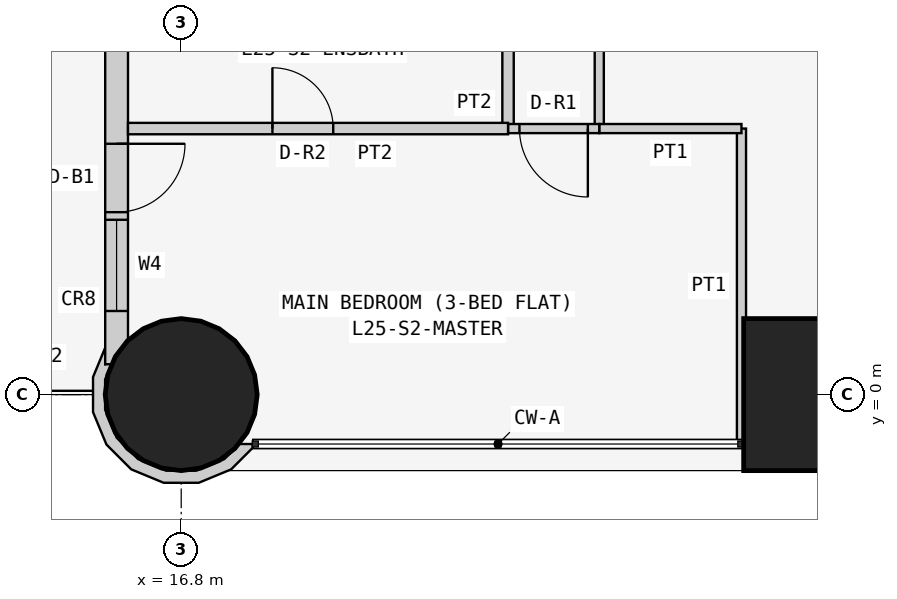
"""IFC4 building model, lengths in metres.
Left out: names, types, materials, properties, quantities, classifications, styles, units other than length and angle.
Written with IfcOpenShell. Run it as: python <this file> out.ifc"""

import sys

from ifc_helpers import new_model, si_unit, direction, frame, frame_2d, origin, origin_2d, place, context, subcontext, project, spatial, polyline, rectangle, circle, outline, extrude, element, fill, save


model = new_model("IFC4")
c1 = context("Model", 3, precision=1e-05, world=origin(), true_north=direction((0.0, 1.0)))
c2 = subcontext(c1, "Body", "Model", "MODEL_VIEW")
j1 = project(units=[si_unit("LENGTHUNIT", "METRE"), si_unit("PLANEANGLEUNIT", "RADIAN")], contexts=[c1])
p1 = place(None, origin())
s1 = spatial("IfcSite", under=j1, at=p1, CompositionType="ELEMENT")
p2 = place(p1, origin())
s2 = spatial("IfcBuilding", under=s1, at=p2, CompositionType="ELEMENT")
p3 = place(p2, frame((0.0, 0.0, 99.3)))
s3 = spatial("IfcBuildingStorey", under=s2, at=p3, CompositionType="ELEMENT", Elevation=99.3)
p4 = place(p3, frame((16.8, 0.0, 0.0), z_axis=(0.0, 0.0, 1.0), x_axis=(1.0, 0.0, 0.0)))
e1 = element("IfcColumn", 1, at=p4, inside=s3, PredefinedType="COLUMN", context=c2, shape_type="SweptSolid", body=[
    extrude(circle(Radius=1.0, at=origin_2d()), origin(), (0.0, 0.0, 1.0), 3.6),
])
p5 = place(p3, frame((25.2, 0.0, 0.0), z_axis=(0.0, 0.0, 1.0), x_axis=(1.0, 0.0, 0.0)))
e2 = element("IfcColumn", 2, at=p5, inside=s3, PredefinedType="COLUMN", context=c2, shape_type="SweptSolid", body=[
    extrude(rectangle(XDim=2.0, YDim=2.0, at=origin_2d()), origin(), (0.0, 0.0, 1.0), 3.6),
])
p6 = place(p3, frame((15.95, 15.8, 0.0), z_axis=(0.0, 0.0, 1.0), x_axis=(0.0, -1.0, 0.0)))
e3 = element("IfcWall", 3, at=p6, inside=s3, PredefinedType="SOLIDWALL", context=c2, shape_type="SweptSolid", body=[
    extrude(rectangle(XDim=15.4, YDim=0.3, at=frame_2d((7.7, 0.0))), origin(), (0.0, 0.0, 1.0), 3.35),
])
p7 = place(p6, frame((1.2, 0.0, 0.9)))
e4 = element("IfcOpeningElement", 4, at=p7, cuts=e3, PredefinedType="OPENING", context=c2, shape_type="SweptSolid", body=[
    extrude(rectangle(XDim=1.8, YDim=1.5, at=frame_2d((0.9, 0.75))), frame((0.0, 0.16, 0.0), z_axis=(0.0, -1.0, 0.0), x_axis=(1.0, 0.0, 0.0)), (0.0, 0.0, 1.0), 0.32),
])
p8 = place(p6, frame((4.95, 0.0, 1.5)))
e5 = element("IfcOpeningElement", 5, at=p8, cuts=e3, PredefinedType="OPENING", context=c2, shape_type="SweptSolid", body=[
    extrude(rectangle(XDim=0.9, YDim=0.7, at=frame_2d((0.45, 0.35))), frame((0.0, 0.16, 0.0), z_axis=(0.0, -1.0, 0.0), x_axis=(1.0, 0.0, 0.0)), (0.0, 0.0, 1.0), 0.32),
])
p9 = place(p6, frame((8.5, 0.0, 0.9)))
e6 = element("IfcOpeningElement", 6, at=p9, cuts=e3, PredefinedType="OPENING", context=c2, shape_type="SweptSolid", body=[
    extrude(rectangle(XDim=1.8, YDim=1.5, at=frame_2d((0.9, 0.75))), frame((0.0, 0.16, 0.0), z_axis=(0.0, -1.0, 0.0), x_axis=(1.0, 0.0, 0.0)), (0.0, 0.0, 1.0), 0.32),
])
p10 = place(p6, frame((12.5, 0.0, 0.0)))
e7 = element("IfcOpeningElement", 7, at=p10, cuts=e3, PredefinedType="OPENING", context=c2, shape_type="SweptSolid", body=[
    extrude(rectangle(XDim=0.9, YDim=2.4, at=frame_2d((0.45, 1.2))), frame((0.0, 0.16, 0.0), z_axis=(0.0, -1.0, 0.0), x_axis=(1.0, 0.0, 0.0)), (0.0, 0.0, 1.0), 0.32),
])
p11 = place(p6, frame((13.5, 0.0, 0.9)))
e8 = element("IfcOpeningElement", 8, at=p11, cuts=e3, PredefinedType="OPENING", context=c2, shape_type="SweptSolid", body=[
    extrude(rectangle(XDim=1.2, YDim=1.5, at=frame_2d((0.6, 0.75))), frame((0.0, 0.16, 0.0), z_axis=(0.0, -1.0, 0.0), x_axis=(1.0, 0.0, 0.0)), (0.0, 0.0, 1.0), 0.32),
])
p12 = place(p3, frame((15.881, 0.567, 0.0), z_axis=(0.0, 0.0, 1.0), x_axis=(-0.555974394895, -0.831199417842, 0.0)))
e9 = element("IfcWall", 9, at=p12, inside=s3, PredefinedType="SOLIDWALL", context=c2, shape_type="SweptSolid", body=[
    extrude(outline(polyline([(0.075, 2.077), (0.351, 2.022), (0.682, 1.801), (0.903, 1.47), (0.981, 1.08), (0.903, 0.689), (0.682, 0.358), (0.351, 0.137), (0.126, 0.092), (0.184, 0.026), (0.004, -0.095), (0.414, -0.013), (0.797, 0.243), (1.053, 0.627), (1.143, 1.08), (1.053, 1.532), (0.796, 1.916), (0.412, 2.172), (0.017, 2.251), (-0.023, 2.224), (0.075, 2.077)])), origin(), (0.0, 0.0, 1.0), 3.35),
])
p13 = place(p3, frame((22.3, 3.5, 0.0), z_axis=(0.0, 0.0, 1.0), x_axis=(0.0, 1.0, 0.0)))
e10 = element("IfcWall", 10, at=p13, inside=s3, PredefinedType="PARTITIONING", context=c2, shape_type="SweptSolid", body=[
    extrude(rectangle(XDim=4.9, YDim=0.12, at=frame_2d((2.45, 0.0))), origin(), (0.0, 0.0, 1.0), 3.35),
])
p14 = place(p13, frame((1.85, 0.0, 0.0)))
e11 = element("IfcOpeningElement", 11, at=p14, cuts=e10, PredefinedType="OPENING", context=c2, shape_type="SweptSolid", body=[
    extrude(rectangle(XDim=0.9, YDim=2.1, at=frame_2d((0.45, 1.05))), frame((0.0, 0.07, 0.0), z_axis=(0.0, -1.0, 0.0), x_axis=(1.0, 0.0, 0.0)), (0.0, 0.0, 1.0), 0.14),
])
p15 = place(p3, frame((24.171, -0.65, 0.0), z_axis=(0.0, 0.0, 1.0), x_axis=(0.0, 1.0, 0.0)))
e12 = element("IfcWall", 12, at=p15, inside=s3, PredefinedType="PARTITIONING", context=c2, shape_type="SweptSolid", body=[
    extrude(rectangle(XDim=4.15, YDim=0.12, at=frame_2d((2.075, 0.0))), origin(), (0.0, 0.0, 1.0), 3.35),
])
p16 = place(p3, frame((24.171, 3.5, 0.0), z_axis=(0.0, 0.0, 1.0), x_axis=(-1.0, 0.0, 0.0)))
e13 = element("IfcWall", 13, at=p16, inside=s3, PredefinedType="PARTITIONING", context=c2, shape_type="SweptSolid", body=[
    extrude(rectangle(XDim=1.871, YDim=0.12, at=frame_2d((0.936, 0.0))), origin(), (0.0, 0.0, 1.0), 3.35),
])
p17 = place(p3, frame((21.1, 3.5, 0.0), z_axis=(0.0, 0.0, 1.0), x_axis=(0.0, 1.0, 0.0)))
e14 = element("IfcWall", 14, at=p17, inside=s3, PredefinedType="PARTITIONING", context=c2, shape_type="SweptSolid", body=[
    extrude(rectangle(XDim=1.7, YDim=0.15, at=frame_2d((0.85, 0.0))), origin(), (0.0, 0.0, 1.0), 2.667),
])
p18 = place(p3, frame((22.3, 3.5, 0.0), z_axis=(0.0, 0.0, 1.0), x_axis=(-1.0, 0.0, 0.0)))
e15 = element("IfcWall", 15, at=p18, inside=s3, PredefinedType="PARTITIONING", context=c2, shape_type="SweptSolid", body=[
    extrude(rectangle(XDim=1.2, YDim=0.12, at=frame_2d((0.6, 0.0))), origin(), (0.0, 0.0, 1.0), 3.35),
])
p19 = place(p18, frame((0.15, 0.0, 0.0)))
e16 = element("IfcOpeningElement", 16, at=p19, cuts=e15, PredefinedType="OPENING", context=c2, shape_type="SweptSolid", body=[
    extrude(rectangle(XDim=0.9, YDim=2.1, at=frame_2d((0.45, 1.05))), frame((0.0, 0.07, 0.0), z_axis=(0.0, -1.0, 0.0), x_axis=(1.0, 0.0, 0.0)), (0.0, 0.0, 1.0), 0.14),
])
p20 = place(p3, frame((21.1, 3.5, 0.0), z_axis=(0.0, 0.0, 1.0), x_axis=(-1.0, 0.0, 0.0)))
e17 = element("IfcWall", 17, at=p20, inside=s3, PredefinedType="PARTITIONING", context=c2, shape_type="SweptSolid", body=[
    extrude(rectangle(XDim=5.0, YDim=0.15, at=frame_2d((2.5, 0.0))), origin(), (0.0, 0.0, 1.0), 3.35),
])
p21 = place(p20, frame((2.3, 0.0, 0.0)))
e18 = element("IfcOpeningElement", 18, at=p21, cuts=e17, PredefinedType="OPENING", context=c2, shape_type="SweptSolid", body=[
    extrude(rectangle(XDim=0.8, YDim=2.1, at=frame_2d((0.4, 1.05))), frame((0.0, 0.085, 0.0), z_axis=(0.0, -1.0, 0.0), x_axis=(1.0, 0.0, 0.0)), (0.0, 0.0, 1.0), 0.17),
])
p22 = place(p10, origin())
e19 = element("IfcDoor", 19, at=p22, inside=s3, OperationType="SINGLE_SWING_LEFT", PredefinedType="DOOR", context=c2, shape_type="SweptSolid", body=[
    extrude(rectangle(XDim=0.9, YDim=2.4, at=frame_2d((0.45, 1.2))), frame((0.0, 0.025, 0.0), z_axis=(0.0, -1.0, 0.0), x_axis=(1.0, 0.0, 0.0)), (0.0, 0.0, 1.0), 0.05),
])
fill(e7, e19)
p23 = place(p11, origin())
e20 = element("IfcWindow", 20, at=p23, inside=s3, PartitioningType="SINGLE_PANEL", PredefinedType="WINDOW", context=c2, shape_type="SweptSolid", body=[
    extrude(rectangle(XDim=1.2, YDim=1.5, at=frame_2d((0.6, 0.75))), frame((0.0, 0.03, 0.0), z_axis=(0.0, -1.0, 0.0), x_axis=(1.0, 0.0, 0.0)), (0.0, 0.0, 1.0), 0.06),
])
fill(e8, e20)
p24 = place(p19, origin())
e21 = element("IfcDoor", 21, at=p24, inside=s3, OperationType="SINGLE_SWING_LEFT", PredefinedType="DOOR", context=c2, shape_type="SweptSolid", body=[
    extrude(rectangle(XDim=0.9, YDim=2.1, at=frame_2d((0.45, 1.05))), frame((0.0, 0.025, 0.0), z_axis=(0.0, -1.0, 0.0), x_axis=(1.0, 0.0, 0.0)), (0.0, 0.0, 1.0), 0.05),
])
fill(e16, e21)
p25 = place(p21, frame((0.8, 0.0, 0.0), z_axis=(0.0, 0.0, 1.0), x_axis=(-1.0, 0.0, 0.0)))
e22 = element("IfcDoor", 22, at=p25, inside=s3, OperationType="SINGLE_SWING_LEFT", PredefinedType="DOOR", context=c2, shape_type="SweptSolid", body=[
    extrude(rectangle(XDim=0.8, YDim=2.1, at=frame_2d((0.4, 1.05))), frame((0.0, 0.025, 0.0), z_axis=(0.0, -1.0, 0.0), x_axis=(1.0, 0.0, 0.0)), (0.0, 0.0, 1.0), 0.05),
])
fill(e18, e22)
save(model, sys.argv[1])
